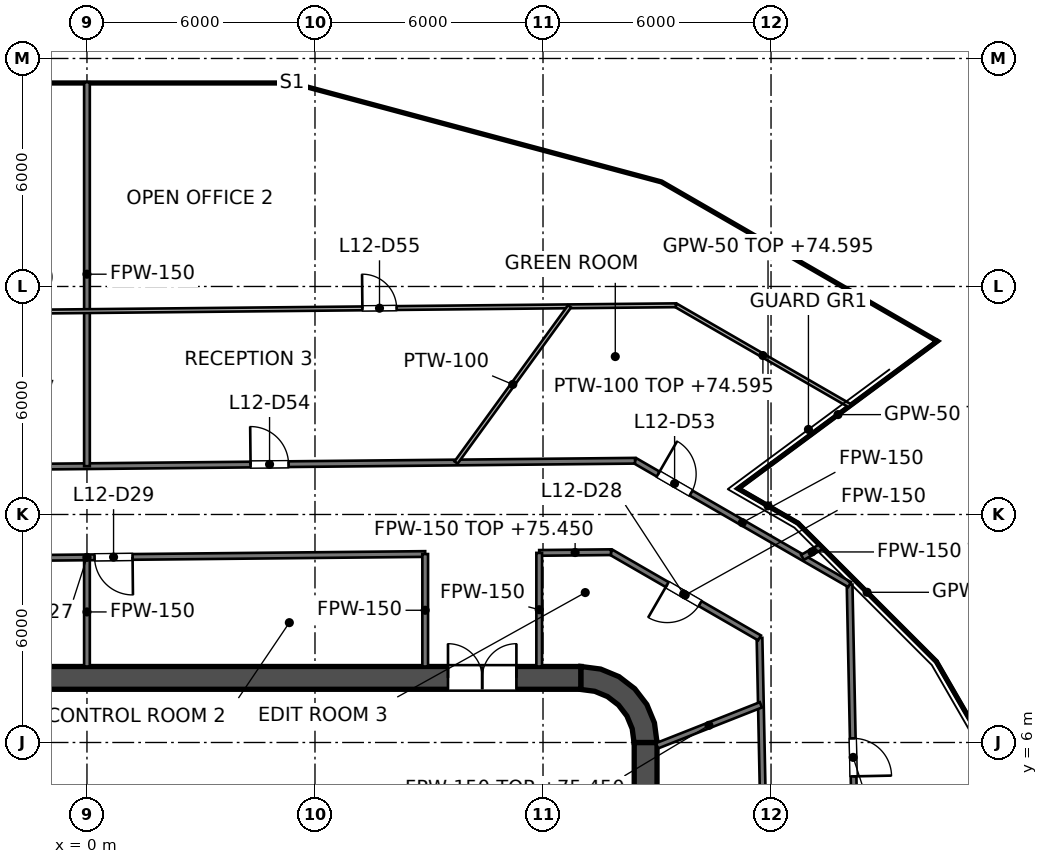
"""IFC4 building model, lengths in metres.
Left out: names, types, materials, properties, quantities, classifications, styles, units other than length and angle.
Written with IfcOpenShell. Run it as: python <this file> out.ifc"""

import sys

from ifc_helpers import new_model, si_unit, direction, frame, frame_2d, origin, place, context, subcontext, project, spatial, polyline, rectangle, outline, extrude, element, fill, save


model = new_model("IFC4")
c1 = context("Model", 3, precision=1e-05, world=origin(), true_north=direction((0.0, 1.0)))
c2 = subcontext(c1, "Body", "Model", "MODEL_VIEW")
j1 = project(units=[si_unit("LENGTHUNIT", "METRE"), si_unit("PLANEANGLEUNIT", "RADIAN")], contexts=[c1])
p1 = place(None, origin())
s1 = spatial("IfcSite", under=j1, at=p1, CompositionType="ELEMENT")
p2 = place(p1, origin())
s2 = spatial("IfcBuilding", under=s1, at=p2, CompositionType="ELEMENT")
p3 = place(p2, frame((0.0, 0.0, 71.4)))
s3 = spatial("IfcBuildingStorey", under=s2, at=p3, CompositionType="ELEMENT", Elevation=71.4)
p4 = place(p3, frame((-13.0, 7.7, 0.0), z_axis=(0.0, 0.0, 1.0), x_axis=(1.0, 0.0, 0.0)))
e1 = element("IfcWall", 1, at=p4, inside=s3, PredefinedType="SHEAR", context=c2, shape_type="SweptSolid", body=[
    extrude(rectangle(XDim=26.0, YDim=0.6, at=frame_2d((13.0, 0.0))), origin(), (0.0, 0.0, 1.0), 4.2),
])
p5 = place(p4, frame((1.7, 0.0, 0.0)))
e2 = element("IfcOpeningElement", 2, at=p5, cuts=e1, PredefinedType="OPENING", context=c2, shape_type="SweptSolid", body=[
    extrude(rectangle(XDim=1.8, YDim=2.1, at=frame_2d((0.9, 1.05))), frame((0.0, 0.3, 0.0), z_axis=(0.0, -1.0, 0.0), x_axis=(1.0, 0.0, 0.0)), (0.0, 0.0, 1.0), 0.6),
])
p6 = place(p4, frame((22.5, 0.0, 0.0)))
e3 = element("IfcOpeningElement", 3, at=p6, cuts=e1, PredefinedType="OPENING", context=c2, shape_type="SweptSolid", body=[
    extrude(rectangle(XDim=1.8, YDim=2.1, at=frame_2d((0.9, 1.05))), frame((0.0, 0.3, 0.0), z_axis=(0.0, -1.0, 0.0), x_axis=(1.0, 0.0, 0.0)), (0.0, 0.0, 1.0), 0.6),
])
p7 = place(p3, frame((14.7, -6.0, 0.0), z_axis=(0.0, 0.0, 1.0), x_axis=(0.0, 1.0, 0.0)))
e4 = element("IfcWall", 4, at=p7, inside=s3, PredefinedType="SHEAR", context=c2, shape_type="SweptSolid", body=[
    extrude(rectangle(XDim=12.0, YDim=0.6, at=frame_2d((6.0, 0.0))), origin(), (0.0, 0.0, 1.0), 4.2),
])
p8 = place(p3, origin())
e5 = element("IfcWall", 5, at=p8, inside=s3, PredefinedType="SHEAR", context=c2, shape_type="SweptSolid", body=[
    extrude(outline(polyline([(13.0, 8.0), (13.0, 7.395), (13.361, 7.347), (13.698, 7.208), (13.986, 6.986), (14.208, 6.698), (14.347, 6.361), (14.395, 6.0), (15.0, 6.0), (14.932, 6.518), (14.732, 7.0), (14.414, 7.414), (14.0, 7.732), (13.518, 7.932), (13.0, 8.0)])), origin(), (0.0, 0.0, 1.0), 4.2),
])
p9 = place(p3, frame((9.0, 4.1, 0.0), z_axis=(0.0, 0.0, 1.0), x_axis=(0.0, 1.0, 0.0)))
e6 = element("IfcWall", 6, at=p9, inside=s3, PredefinedType="SOLIDWALL", context=c2, shape_type="SweptSolid", body=[
    extrude(rectangle(XDim=2.5, YDim=0.25, at=frame_2d((1.25, 0.0))), origin(), (0.0, 0.0, 1.0), 4.05),
])
p10 = place(p9, frame((0.65, 0.0, 0.0)))
e7 = element("IfcOpeningElement", 7, at=p10, cuts=e6, PredefinedType="OPENING", context=c2, shape_type="SweptSolid", body=[
    extrude(rectangle(XDim=1.2, YDim=2.1, at=frame_2d((0.6, 1.05))), frame((0.0, 0.125, 0.0), z_axis=(0.0, -1.0, 0.0), x_axis=(1.0, 0.0, 0.0)), (0.0, 0.0, 1.0), 0.25),
])
p11 = place(p3, frame((3.15, 4.1, 0.0), z_axis=(0.0, 0.0, 1.0), x_axis=(0.0, 1.0, 0.0)))
e8 = element("IfcWall", 8, at=p11, inside=s3, PredefinedType="SOLIDWALL", context=c2, shape_type="SweptSolid", body=[
    extrude(rectangle(XDim=2.5, YDim=0.25, at=frame_2d((1.25, 0.0))), origin(), (0.0, 0.0, 1.0), 4.05),
])
p12 = place(p3, frame((-9.125, 7.0, 0.0), z_axis=(0.0, 0.0, 1.0), x_axis=(1.0, 0.0, 0.0)))
e9 = element("IfcWall", 9, at=p12, inside=s3, PredefinedType="SOLIDWALL", context=c2, shape_type="SweptSolid", body=[
    extrude(rectangle(XDim=18.25, YDim=0.8, at=frame_2d((9.125, 0.0))), origin(), (0.0, 0.0, 1.0), 4.05),
])
p13 = place(p3, frame((11.8, -7.4, 0.0), z_axis=(0.0, 0.0, 1.0), x_axis=(0.0, 1.0, 0.0)))
e10 = element("IfcWall", 10, at=p13, inside=s3, PredefinedType="SOLIDWALL", context=c2, shape_type="SweptSolid", body=[
    extrude(rectangle(XDim=14.8, YDim=0.4, at=frame_2d((7.4, 0.0))), origin(), (0.0, 0.0, 1.0), 4.05),
])
p14 = place(p13, frame((11.2, 0.0, 0.0)))
e11 = element("IfcOpeningElement", 11, at=p14, cuts=e10, PredefinedType="OPENING", context=c2, shape_type="SweptSolid", body=[
    extrude(rectangle(XDim=1.1, YDim=2.1, at=frame_2d((0.55, 1.05))), frame((0.0, 0.2, 0.0), z_axis=(0.0, -1.0, 0.0), x_axis=(1.0, 0.0, 0.0)), (0.0, 0.0, 1.0), 0.4),
])
p15 = place(p13, frame((8.3, 0.0, 0.0)))
e12 = element("IfcOpeningElement", 12, at=p15, cuts=e10, PredefinedType="OPENING", context=c2, shape_type="SweptSolid", body=[
    extrude(rectangle(XDim=1.1, YDim=2.1, at=frame_2d((0.55, 1.05))), frame((0.0, 0.2, 0.0), z_axis=(0.0, -1.0, 0.0), x_axis=(1.0, 0.0, 0.0)), (0.0, 0.0, 1.0), 0.4),
])
p16 = place(p13, frame((5.4, 0.0, 0.0)))
e13 = element("IfcOpeningElement", 13, at=p16, cuts=e10, PredefinedType="OPENING", context=c2, shape_type="SweptSolid", body=[
    extrude(rectangle(XDim=1.1, YDim=2.1, at=frame_2d((0.55, 1.05))), frame((0.0, 0.2, 0.0), z_axis=(0.0, -1.0, 0.0), x_axis=(1.0, 0.0, 0.0)), (0.0, 0.0, 1.0), 0.4),
])
p17 = place(p13, frame((13.552, 0.0, 0.0)))
e14 = element("IfcOpeningElement", 14, at=p17, cuts=e10, PredefinedType="OPENING", context=c2, shape_type="SweptSolid", body=[
    extrude(rectangle(XDim=0.9, YDim=2.1, at=frame_2d((0.45, 1.05))), frame((0.0, 0.2, 0.0), z_axis=(0.0, -1.0, 0.0), x_axis=(1.0, 0.0, 0.0)), (0.0, 0.0, 1.0), 0.4),
])
p18 = place(p13, frame((0.347, 0.0, 0.0)))
e15 = element("IfcOpeningElement", 15, at=p18, cuts=e10, PredefinedType="OPENING", context=c2, shape_type="SweptSolid", body=[
    extrude(rectangle(XDim=0.9, YDim=2.1, at=frame_2d((0.45, 1.05))), frame((0.0, 0.2, 0.0), z_axis=(0.0, -1.0, 0.0), x_axis=(1.0, 0.0, 0.0)), (0.0, 0.0, 1.0), 0.4),
])
e16 = element("IfcWall", 16, at=p8, inside=s3, PredefinedType="SOLIDWALL", context=c2, shape_type="SweptSolid", body=[
    extrude(outline(polyline([(12.0, -5.675), (12.0, -5.925), (14.15, -5.925), (14.4, -5.925), (14.4, -5.675), (14.4, -3.025), (14.4, -2.775), (14.4, -0.125), (14.4, 0.125), (14.4, 2.775), (14.4, 3.025), (14.4, 5.675), (14.4, 5.925), (14.15, 5.925), (12.0, 5.925), (12.0, 5.675), (14.15, 5.675), (14.15, 3.025), (12.0, 3.025), (12.0, 2.775), (14.15, 2.775), (14.15, 0.125), (12.0, 0.125), (12.0, -0.125), (14.15, -0.125), (14.15, -2.775), (12.0, -2.775), (12.0, -3.025), (14.15, -3.025), (14.15, -5.675), (12.0, -5.675)])), origin(), (0.0, 0.0, 1.0), 4.05),
])
p19 = place(p3, frame((17.697, 8.753, 0.0), z_axis=(0.0, 0.0, 1.0), x_axis=(0.020608181841, -0.99978762887, 0.0)))
e17 = element("IfcWall", 17, at=p19, inside=s3, PredefinedType="PARTITIONING", context=c2, shape_type="SweptSolid", body=[
    extrude(rectangle(XDim=15.531, YDim=0.15, at=frame_2d((7.766, 0.0))), origin(), (0.0, 0.0, 1.0), 3.127),
])
p20 = place(p19, frame((11.596, 0.0, 0.0)))
e18 = element("IfcOpeningElement", 18, at=p20, cuts=e17, PredefinedType="OPENING", context=c2, shape_type="SweptSolid", body=[
    extrude(rectangle(XDim=1.0, YDim=2.1, at=frame_2d((0.5, 1.05))), frame((0.0, 0.075, 0.0), z_axis=(0.0, -1.0, 0.0), x_axis=(1.0, 0.0, 0.0)), (0.0, 0.0, 1.0), 0.15),
])
p21 = place(p19, frame((7.216, 0.0, 0.0)))
e19 = element("IfcOpeningElement", 19, at=p21, cuts=e17, PredefinedType="OPENING", context=c2, shape_type="SweptSolid", body=[
    extrude(rectangle(XDim=1.0, YDim=2.1, at=frame_2d((0.5, 1.05))), frame((0.0, 0.075, 0.0), z_axis=(0.0, -1.0, 0.0), x_axis=(1.0, 0.0, 0.0)), (0.0, 0.0, 1.0), 0.15),
])
p22 = place(p3, frame((20.067, 10.155, 0.0), z_axis=(0.0, 0.0, 1.0), x_axis=(0.020611882214, -0.999787552589, 0.0)))
e20 = element("IfcWall", 20, at=p22, inside=s3, PredefinedType="PARTITIONING", context=c2, shape_type="SweptSolid", body=[
    extrude(rectangle(XDim=17.554, YDim=0.15, at=frame_2d((8.777, 0.0))), origin(), (0.0, 0.0, 1.0), 3.127),
])
p23 = place(p22, frame((11.808, 0.0, 0.0)))
e21 = element("IfcOpeningElement", 21, at=p23, cuts=e20, PredefinedType="OPENING", context=c2, shape_type="SweptSolid", body=[
    extrude(rectangle(XDim=1.0, YDim=2.1, at=frame_2d((0.5, 1.05))), frame((0.0, 0.075, 0.0), z_axis=(0.0, -1.0, 0.0), x_axis=(1.0, 0.0, 0.0)), (0.0, 0.0, 1.0), 0.15),
])
p24 = place(p22, frame((4.048, 0.0, 0.0)))
e22 = element("IfcOpeningElement", 22, at=p24, cuts=e20, PredefinedType="OPENING", context=c2, shape_type="SweptSolid", body=[
    extrude(rectangle(XDim=1.0, YDim=2.1, at=frame_2d((0.5, 1.05))), frame((0.0, 0.075, 0.0), z_axis=(0.0, -1.0, 0.0), x_axis=(1.0, 0.0, 0.0)), (0.0, 0.0, 1.0), 0.15),
])
p25 = place(p3, frame((13.79, 11.008, 0.0), z_axis=(0.0, 0.0, 1.0), x_axis=(0.866043190618, -0.499969191034, 0.0)))
e23 = element("IfcWall", 23, at=p25, inside=s3, PredefinedType="PARTITIONING", context=c2, shape_type="SweptSolid", body=[
    extrude(rectangle(XDim=4.511, YDim=0.15, at=frame_2d((2.255, 0.0))), origin(), (0.0, 0.0, 1.0), 3.195),
])
p26 = place(p25, frame((1.706, 0.0, 0.0)))
e24 = element("IfcOpeningElement", 24, at=p26, cuts=e23, PredefinedType="OPENING", context=c2, shape_type="SweptSolid", body=[
    extrude(rectangle(XDim=1.0, YDim=2.1, at=frame_2d((0.5, 1.05))), frame((0.0, 0.075, 0.0), z_axis=(0.0, -1.0, 0.0), x_axis=(1.0, 0.0, 0.0)), (0.0, 0.0, 1.0), 0.15),
])
p27 = place(p3, frame((14.422, 13.414, 0.0), z_axis=(0.0, 0.0, 1.0), x_axis=(0.866054628924, -0.499949377157, 0.0)))
e25 = element("IfcWall", 25, at=p27, inside=s3, PredefinedType="PARTITIONING", context=c2, shape_type="SweptSolid", body=[
    extrude(rectangle(XDim=6.519, YDim=0.15, at=frame_2d((3.26, 0.0))), origin(), (0.0, 0.0, 1.0), 3.195),
])
p28 = place(p27, frame((0.701, 0.0, 0.0)))
e26 = element("IfcOpeningElement", 26, at=p28, cuts=e25, PredefinedType="OPENING", context=c2, shape_type="SweptSolid", body=[
    extrude(rectangle(XDim=1.0, YDim=2.1, at=frame_2d((0.5, 1.05))), frame((0.0, 0.075, 0.0), z_axis=(0.0, -1.0, 0.0), x_axis=(1.0, 0.0, 0.0)), (0.0, 0.0, 1.0), 0.15),
])
p29 = place(p3, frame((-8.9, 10.783, 0.0), z_axis=(0.0, 0.0, 1.0), x_axis=(0.999950697987, 0.009929833562, 0.0)))
e27 = element("IfcWall", 27, at=p29, inside=s3, PredefinedType="PARTITIONING", context=c2, shape_type="SweptSolid", body=[
    extrude(rectangle(XDim=17.801, YDim=0.15, at=frame_2d((8.9, 0.0))), origin(), (0.0, 0.0, 1.0), 3.127),
])
p30 = place(p29, frame((9.1, 0.0, 0.0)))
e28 = element("IfcOpeningElement", 28, at=p30, cuts=e27, PredefinedType="OPENING", context=c2, shape_type="SweptSolid", body=[
    extrude(rectangle(XDim=1.0, YDim=2.1, at=frame_2d((0.5, 1.05))), frame((0.0, 0.075, 0.0), z_axis=(0.0, -1.0, 0.0), x_axis=(1.0, 0.0, 0.0)), (0.0, 0.0, 1.0), 0.15),
])
p31 = place(p29, frame((3.9, 0.0, 0.0)))
e29 = element("IfcOpeningElement", 29, at=p31, cuts=e27, PredefinedType="OPENING", context=c2, shape_type="SweptSolid", body=[
    extrude(rectangle(XDim=1.0, YDim=2.1, at=frame_2d((0.5, 1.05))), frame((0.0, 0.075, 0.0), z_axis=(0.0, -1.0, 0.0), x_axis=(1.0, 0.0, 0.0)), (0.0, 0.0, 1.0), 0.15),
])
p32 = place(p3, frame((11.9, 10.989, 0.0), z_axis=(0.0, 0.0, 1.0), x_axis=(0.999950544693, 0.009945258582, 0.0)))
e30 = element("IfcWall", 30, at=p32, inside=s3, PredefinedType="PARTITIONING", context=c2, shape_type="SweptSolid", body=[
    extrude(rectangle(XDim=1.89, YDim=0.15, at=frame_2d((0.945, 0.0))), origin(), (0.0, 0.0, 1.0), 4.05),
])
p33 = place(p3, frame((-17.135, 13.101, 0.0), z_axis=(0.0, 0.0, 1.0), x_axis=(0.999950742047, 0.009925395736, 0.0)))
e31 = element("IfcWall", 31, at=p33, inside=s3, PredefinedType="PARTITIONING", context=c2, shape_type="SweptSolid", body=[
    extrude(rectangle(XDim=31.559, YDim=0.15, at=frame_2d((15.779, 0.0))), origin(), (0.0, 0.0, 1.0), 3.127),
])
p34 = place(p33, frame((21.441, 0.0, 0.0)))
e32 = element("IfcOpeningElement", 32, at=p34, cuts=e31, PredefinedType="OPENING", context=c2, shape_type="SweptSolid", body=[
    extrude(rectangle(XDim=1.0, YDim=2.1, at=frame_2d((0.5, 1.05))), frame((0.0, 0.075, 0.0), z_axis=(0.0, -1.0, 0.0), x_axis=(1.0, 0.0, 0.0)), (0.0, 0.0, 1.0), 0.15),
])
p35 = place(p33, frame((8.739, 0.0, 0.0)))
e33 = element("IfcOpeningElement", 33, at=p35, cuts=e31, PredefinedType="OPENING", context=c2, shape_type="SweptSolid", body=[
    extrude(rectangle(XDim=1.0, YDim=2.1, at=frame_2d((0.5, 1.05))), frame((0.0, 0.075, 0.0), z_axis=(0.0, -1.0, 0.0), x_axis=(1.0, 0.0, 0.0)), (0.0, 0.0, 1.0), 0.15),
])
p36 = place(p3, frame((15.0, 5.913, 0.0), z_axis=(0.0, 0.0, 1.0), x_axis=(0.930259747539, 0.366901624565, 0.0)))
e34 = element("IfcWall", 34, at=p36, inside=s3, PredefinedType="PARTITIONING", context=c2, shape_type="SweptSolid", body=[
    extrude(rectangle(XDim=2.938, YDim=0.15, at=frame_2d((1.469, 0.0))), origin(), (0.0, 0.0, 1.0), 4.05),
])
p37 = place(p3, frame((18.828, 10.871, 0.0), z_axis=(0.0, 0.0, 1.0), x_axis=(0.866242357422, 0.49962403686, 0.0)))
e35 = element("IfcWall", 35, at=p37, inside=s3, PredefinedType="PARTITIONING", context=c2, shape_type="SweptSolid", body=[
    extrude(rectangle(XDim=0.573, YDim=0.15, at=frame_2d((0.286, 0.0))), origin(), (0.0, 0.0, 1.0), 4.05),
])
p38 = place(p3, frame((11.9, 8.0, 0.0), z_axis=(0.0, 0.0, 1.0), x_axis=(0.0, 1.0, 0.0)))
e36 = element("IfcWall", 36, at=p38, inside=s3, PredefinedType="PARTITIONING", context=c2, shape_type="SweptSolid", body=[
    extrude(rectangle(XDim=2.989, YDim=0.15, at=frame_2d((1.495, 0.0))), origin(), (0.0, 0.0, 1.0), 3.195),
])
p39 = place(p3, frame((8.9, 8.0, 0.0), z_axis=(0.0, 0.0, 1.0), x_axis=(0.0, 1.0, 0.0)))
e37 = element("IfcWall", 37, at=p39, inside=s3, PredefinedType="PARTITIONING", context=c2, shape_type="SweptSolid", body=[
    extrude(rectangle(XDim=2.959, YDim=0.15, at=frame_2d((1.479, 0.0))), origin(), (0.0, 0.0, 1.0), 3.195),
])
p40 = place(p3, frame((0.0, 8.0, 0.0), z_axis=(0.0, 0.0, 1.0), x_axis=(0.0, 1.0, 0.0)))
e38 = element("IfcWall", 38, at=p40, inside=s3, PredefinedType="PARTITIONING", context=c2, shape_type="SweptSolid", body=[
    extrude(rectangle(XDim=2.871, YDim=0.15, at=frame_2d((1.436, 0.0))), origin(), (0.0, 0.0, 1.0), 3.195),
])
p41 = place(p3, frame((0.0, 13.271, 0.0), z_axis=(0.0, 0.0, 1.0), x_axis=(0.0, 1.0, 0.0)))
e39 = element("IfcWall", 39, at=p41, inside=s3, PredefinedType="PARTITIONING", context=c2, shape_type="SweptSolid", body=[
    extrude(rectangle(XDim=10.104, YDim=0.15, at=frame_2d((5.052, 0.0))), origin(), (0.0, 0.0, 1.0), 3.195),
])
p42 = place(p3, frame((22.349, 8.132, 0.0), z_axis=(0.0, 0.0, 1.0), x_axis=(0.500744318686, -0.865595244502, 0.0)))
e40 = element("IfcWall", 40, at=p42, inside=s3, PredefinedType="PARTITIONING", context=c2, shape_type="SweptSolid", body=[
    extrude(rectangle(XDim=3.956, YDim=0.05, at=frame_2d((1.978, 0.0))), origin(), (0.0, 0.0, 1.0), 3.127),
])
p43 = place(p3, frame((18.708, 11.773, 0.0), z_axis=(0.0, 0.0, 1.0), x_axis=(0.707130487725, -0.707083073853, 0.0)))
e41 = element("IfcWall", 41, at=p43, inside=s3, PredefinedType="PARTITIONING", context=c2, shape_type="SweptSolid", body=[
    extrude(rectangle(XDim=5.149, YDim=0.05, at=frame_2d((2.575, 0.0))), origin(), (0.0, 0.0, 1.0), 3.195),
])
p44 = place(p3, frame((17.134, 12.682, 0.0), z_axis=(0.0, 0.0, 1.0), x_axis=(0.865977542148, -0.500082889625, 0.0)))
e42 = element("IfcWall", 42, at=p44, inside=s3, PredefinedType="PARTITIONING", context=c2, shape_type="SweptSolid", body=[
    extrude(rectangle(XDim=1.818, YDim=0.05, at=frame_2d((0.909, 0.0))), origin(), (0.0, 0.0, 1.0), 3.195),
])
p45 = place(p3, frame((17.134, 12.682, 0.0), z_axis=(0.0, 0.0, 1.0), x_axis=(0.80379050332, 0.594912453033, 0.0)))
e43 = element("IfcWall", 43, at=p45, inside=s3, PredefinedType="PARTITIONING", context=c2, shape_type="SweptSolid", body=[
    extrude(rectangle(XDim=6.542, YDim=0.05, at=frame_2d((3.271, 0.0))), origin(), (0.0, 0.0, 1.0), 3.195),
])
p46 = place(p3, frame((15.496, 17.505, 0.0), z_axis=(0.0, 0.0, 1.0), x_axis=(0.865998786996, -0.500046098797, 0.0)))
e44 = element("IfcWall", 44, at=p46, inside=s3, PredefinedType="PARTITIONING", context=c2, shape_type="SweptSolid", body=[
    extrude(rectangle(XDim=5.289, YDim=0.1, at=frame_2d((2.645, 0.0))), origin(), (0.0, 0.0, 1.0), 3.195),
])
p47 = place(p3, frame((-19.504, 17.158, 0.0), z_axis=(0.0, 0.0, 1.0), x_axis=(0.999950671051, 0.009932545728, 0.0)))
e45 = element("IfcWall", 45, at=p47, inside=s3, PredefinedType="PARTITIONING", context=c2, shape_type="SweptSolid", body=[
    extrude(rectangle(XDim=35.002, YDim=0.1, at=frame_2d((17.501, 0.0))), origin(), (0.0, 0.0, 1.0), 3.127),
])
p48 = place(p47, frame((26.753, 0.0, 0.0)))
e46 = element("IfcOpeningElement", 46, at=p48, cuts=e45, PredefinedType="OPENING", context=c2, shape_type="SweptSolid", body=[
    extrude(rectangle(XDim=0.9, YDim=2.1, at=frame_2d((0.45, 1.05))), frame((0.0, 0.05, 0.0), z_axis=(0.0, -1.0, 0.0), x_axis=(1.0, 0.0, 0.0)), (0.0, 0.0, 1.0), 0.1),
])
p49 = place(p47, frame((10.463, 0.0, 0.0)))
e47 = element("IfcOpeningElement", 47, at=p49, cuts=e45, PredefinedType="OPENING", context=c2, shape_type="SweptSolid", body=[
    extrude(rectangle(XDim=0.9, YDim=2.1, at=frame_2d((0.45, 1.05))), frame((0.0, 0.05, 0.0), z_axis=(0.0, -1.0, 0.0), x_axis=(1.0, 0.0, 0.0)), (0.0, 0.0, 1.0), 0.1),
])
p50 = place(p3, frame((9.712, 13.367, 0.0), z_axis=(0.0, 0.0, 1.0), x_axis=(0.587774449377, 0.809024843043, 0.0)))
e48 = element("IfcWall", 48, at=p50, inside=s3, PredefinedType="PARTITIONING", context=c2, shape_type="SweptSolid", body=[
    extrude(rectangle(XDim=5.08, YDim=0.1, at=frame_2d((2.54, 0.0))), origin(), (0.0, 0.0, 1.0), 3.127),
])
p51 = place(p10, origin())
e49 = element("IfcDoor", 49, at=p51, inside=s3, OperationType="SINGLE_SWING_LEFT", PredefinedType="DOOR", context=c2, shape_type="SweptSolid", body=[
    extrude(rectangle(XDim=1.2, YDim=2.1, at=frame_2d((0.6, 1.05))), frame((0.0, 0.025, 0.0), z_axis=(0.0, -1.0, 0.0), x_axis=(1.0, 0.0, 0.0)), (0.0, 0.0, 1.0), 0.05),
])
fill(e7, e49)
p52 = place(p17, origin())
e50 = element("IfcDoor", 50, at=p52, inside=s3, OperationType="SINGLE_SWING_RIGHT", PredefinedType="DOOR", context=c2, shape_type="SweptSolid", body=[
    extrude(rectangle(XDim=0.9, YDim=2.1, at=frame_2d((0.45, 1.05))), frame((0.0, 0.025, 0.0), z_axis=(0.0, -1.0, 0.0), x_axis=(1.0, 0.0, 0.0)), (0.0, 0.0, 1.0), 0.05),
])
fill(e14, e50)
p53 = place(p6, origin())
e51 = element("IfcDoor", 51, at=p53, inside=s3, OperationType="DOUBLE_DOOR_SINGLE_SWING", PredefinedType="DOOR", context=c2, shape_type="SweptSolid", body=[
    extrude(rectangle(XDim=1.8, YDim=2.1, at=frame_2d((0.9, 1.05))), frame((0.0, 0.025, 0.0), z_axis=(0.0, -1.0, 0.0), x_axis=(1.0, 0.0, 0.0)), (0.0, 0.0, 1.0), 0.05),
])
fill(e3, e51)
p54 = place(p26, origin())
e52 = element("IfcDoor", 52, at=p54, inside=s3, OperationType="SINGLE_SWING_LEFT", PredefinedType="DOOR", context=c2, shape_type="SweptSolid", body=[
    extrude(rectangle(XDim=1.0, YDim=2.1, at=frame_2d((0.5, 1.05))), frame((0.0, 0.025, 0.0), z_axis=(0.0, -1.0, 0.0), x_axis=(1.0, 0.0, 0.0)), (0.0, 0.0, 1.0), 0.05),
])
fill(e24, e52)
p55 = place(p30, origin())
e53 = element("IfcDoor", 53, at=p55, inside=s3, OperationType="SINGLE_SWING_RIGHT", PredefinedType="DOOR", context=c2, shape_type="SweptSolid", body=[
    extrude(rectangle(XDim=1.0, YDim=2.1, at=frame_2d((0.5, 1.05))), frame((0.0, 0.025, 0.0), z_axis=(0.0, -1.0, 0.0), x_axis=(1.0, 0.0, 0.0)), (0.0, 0.0, 1.0), 0.05),
])
fill(e28, e53)
p56 = place(p24, origin())
e54 = element("IfcDoor", 54, at=p56, inside=s3, OperationType="SINGLE_SWING_RIGHT", PredefinedType="DOOR", context=c2, shape_type="SweptSolid", body=[
    extrude(rectangle(XDim=1.0, YDim=2.1, at=frame_2d((0.5, 1.05))), frame((0.0, 0.025, 0.0), z_axis=(0.0, -1.0, 0.0), x_axis=(1.0, 0.0, 0.0)), (0.0, 0.0, 1.0), 0.05),
])
fill(e22, e54)
p57 = place(p28, origin())
e55 = element("IfcDoor", 55, at=p57, inside=s3, OperationType="SINGLE_SWING_LEFT", PredefinedType="DOOR", context=c2, shape_type="SweptSolid", body=[
    extrude(rectangle(XDim=1.0, YDim=2.1, at=frame_2d((0.5, 1.05))), frame((0.0, 0.025, 0.0), z_axis=(0.0, -1.0, 0.0), x_axis=(1.0, 0.0, 0.0)), (0.0, 0.0, 1.0), 0.05),
])
fill(e26, e55)
p58 = place(p34, origin())
e56 = element("IfcDoor", 56, at=p58, inside=s3, OperationType="SINGLE_SWING_LEFT", PredefinedType="DOOR", context=c2, shape_type="SweptSolid", body=[
    extrude(rectangle(XDim=1.0, YDim=2.1, at=frame_2d((0.5, 1.05))), frame((0.0, 0.025, 0.0), z_axis=(0.0, -1.0, 0.0), x_axis=(1.0, 0.0, 0.0)), (0.0, 0.0, 1.0), 0.05),
])
fill(e32, e56)
p59 = place(p48, origin())
e57 = element("IfcDoor", 57, at=p59, inside=s3, OperationType="SINGLE_SWING_LEFT", PredefinedType="DOOR", context=c2, shape_type="SweptSolid", body=[
    extrude(rectangle(XDim=0.9, YDim=2.1, at=frame_2d((0.45, 1.05))), frame((0.0, 0.025, 0.0), z_axis=(0.0, -1.0, 0.0), x_axis=(1.0, 0.0, 0.0)), (0.0, 0.0, 1.0), 0.05),
])
fill(e46, e57)
save(model, sys.argv[1])
